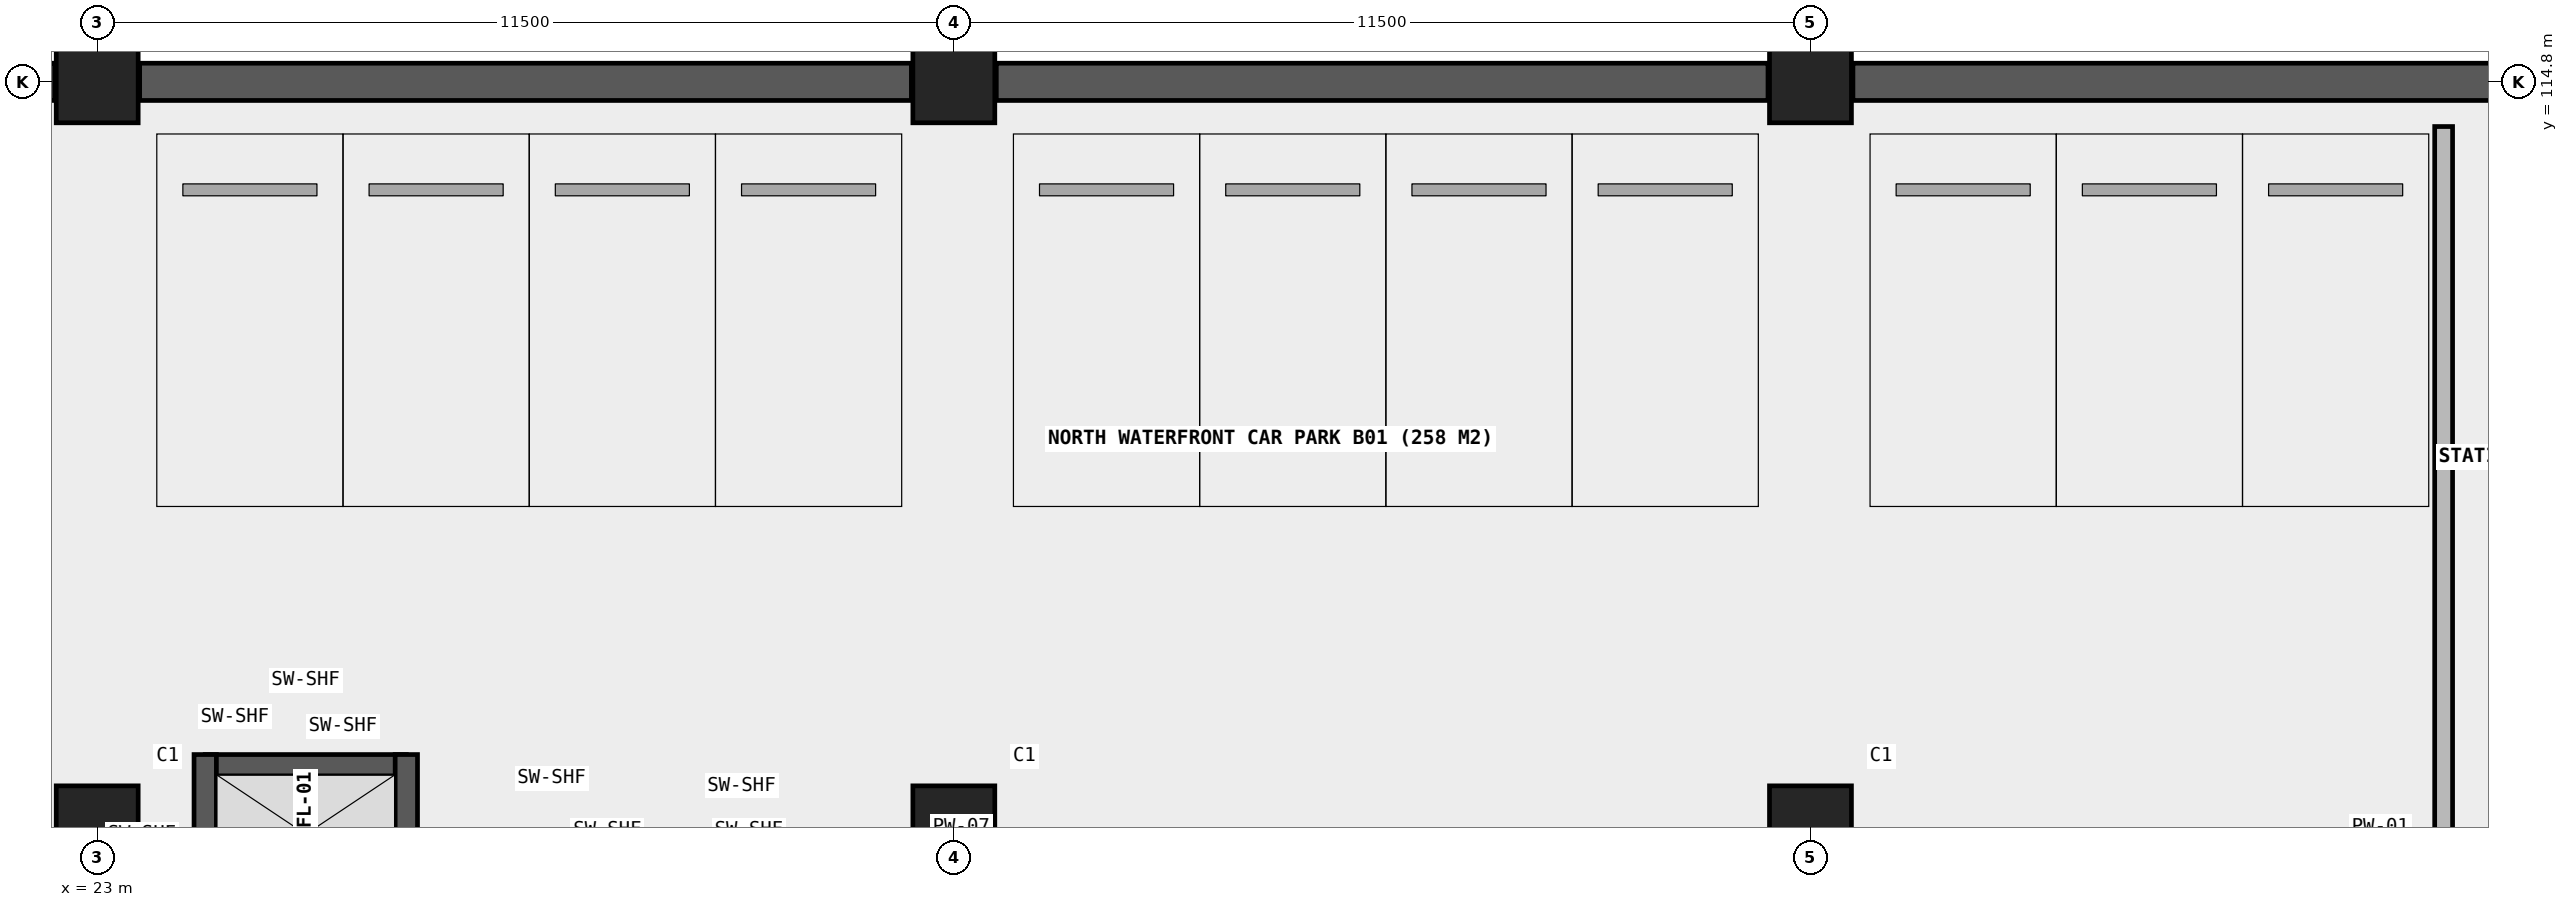
"""IFC4 building model, lengths in metres.
Left out: names, types, materials, properties, quantities, classifications, styles, units other than length and angle.
Written with IfcOpenShell. Run it as: python <this file> out.ifc"""

import sys

from ifc_helpers import new_model, si_unit, direction, frame, frame_2d, origin, origin_2d, place, context, subcontext, project, spatial, rectangle, extrude, element, save


model = new_model("IFC4")
c1 = context("Model", 3, precision=1e-05, world=origin(), true_north=direction((0.0, 1.0)))
c2 = subcontext(c1, "Body", "Model", "MODEL_VIEW")
j1 = project(units=[si_unit("LENGTHUNIT", "METRE"), si_unit("PLANEANGLEUNIT", "RADIAN")], contexts=[c1])
p1 = place(None, origin())
s1 = spatial("IfcSite", under=j1, at=p1, CompositionType="ELEMENT")
p2 = place(p1, origin())
s2 = spatial("IfcBuilding", under=s1, at=p2, CompositionType="ELEMENT")
p3 = place(p2, frame((0.0, 0.0, -4.2)))
s3 = spatial("IfcBuildingStorey", under=s2, at=p3, CompositionType="ELEMENT", Elevation=-4.2)
for number, where, z_axis, x_axis in (
    (1, (23.0, 104.8, 0.0), (0.0, 0.0, 1.0), (1.0, 0.0, 0.0)),
    (2, (23.0, 114.8, 0.0), (0.0, 0.0, 1.0), (1.0, 0.0, 0.0)),
    (3, (34.5, 104.8, 0.0), (0.0, 0.0, 1.0), (1.0, 0.0, 0.0)),
    (4, (34.5, 114.8, 0.0), (0.0, 0.0, 1.0), (1.0, 0.0, 0.0)),
    (5, (46.0, 104.8, 0.0), (0.0, 0.0, 1.0), (1.0, 0.0, 0.0)),
    (6, (46.0, 114.8, 0.0), (0.0, 0.0, 1.0), (1.0, 0.0, 0.0)),
):
    element("IfcColumn", number, at=place(p3, frame(where, z_axis=z_axis, x_axis=x_axis)), inside=s3, PredefinedType="COLUMN", context=c2, shape_type="SweptSolid", body=[
        extrude(rectangle(XDim=1.1, YDim=1.1, at=origin_2d()), origin(), (0.0, 0.0, 1.0), 4.2),
    ])
for number, where, z_axis, x_axis in (
    (7, (12.07, 114.8, 0.0), (0.0, 0.0, 1.0), (1.0, 0.0, 0.0)),
    (8, (23.57, 114.8, 0.0), (0.0, 0.0, 1.0), (1.0, 0.0, 0.0)),
    (9, (35.07, 114.8, 0.0), (0.0, 0.0, 1.0), (1.0, 0.0, 0.0)),
    (10, (46.57, 114.8, 0.0), (0.0, 0.0, 1.0), (1.0, 0.0, 0.0)),
):
    element("IfcWall", number, at=place(p3, frame(where, z_axis=z_axis, x_axis=x_axis)), inside=s3, PredefinedType="SHEAR", context=c2, shape_type="SweptSolid", body=[
        extrude(rectangle(XDim=10.36, YDim=0.5, at=frame_2d((5.18, 0.0))), origin(), (0.0, 0.0, 1.0), 4.2),
    ])
p4 = place(p3, frame((24.45, 105.62, 0.0), z_axis=(0.0, 0.0, 1.0), x_axis=(1.0, 0.0, 0.0)))
e11 = element("IfcWall", 11, at=p4, inside=s3, PredefinedType="SHEAR", context=c2, shape_type="SweptSolid", body=[
    extrude(rectangle(XDim=2.7, YDim=0.3, at=frame_2d((1.35, 0.0))), origin(), (0.0, 0.0, 1.0), 4.2),
])
for number, where, z_axis, x_axis in (
    (12, (24.45, 103.63, 0.0), (0.0, 0.0, 1.0), (0.0, 1.0, 0.0)),
    (13, (27.15, 103.63, 0.0), (0.0, 0.0, 1.0), (0.0, 1.0, 0.0)),
):
    element("IfcWall", number, at=place(p3, frame(where, z_axis=z_axis, x_axis=x_axis)), inside=s3, PredefinedType="SHEAR", context=c2, shape_type="SweptSolid", body=[
        extrude(rectangle(XDim=2.14, YDim=0.3, at=frame_2d((1.07, 0.0))), origin(), (0.0, 0.0, 1.0), 4.2),
    ])
p5 = place(p3, frame((54.5, 95.4, 0.0), z_axis=(0.0, 0.0, 1.0), x_axis=(0.0, 1.0, 0.0)))
e14 = element("IfcWall", 14, at=p5, inside=s3, PredefinedType="SOLIDWALL", context=c2, shape_type="SweptSolid", body=[
    extrude(rectangle(XDim=18.8, YDim=0.24, at=frame_2d((9.4, 0.0))), origin(), (0.0, 0.0, 1.0), 3.86),
])
p6 = place(p5, frame((4.2, 0.0, 0.0)))
e15 = element("IfcOpeningElement", 15, at=p6, cuts=e14, PredefinedType="OPENING", context=c2, shape_type="SweptSolid", body=[
    extrude(rectangle(XDim=0.96, YDim=2.1, at=frame_2d((0.48, 1.05))), frame((0.0, 0.13, 0.0), z_axis=(0.0, -1.0, 0.0), x_axis=(1.0, 0.0, 0.0)), (0.0, 0.0, 1.0), 0.26),
])
save(model, sys.argv[1])
